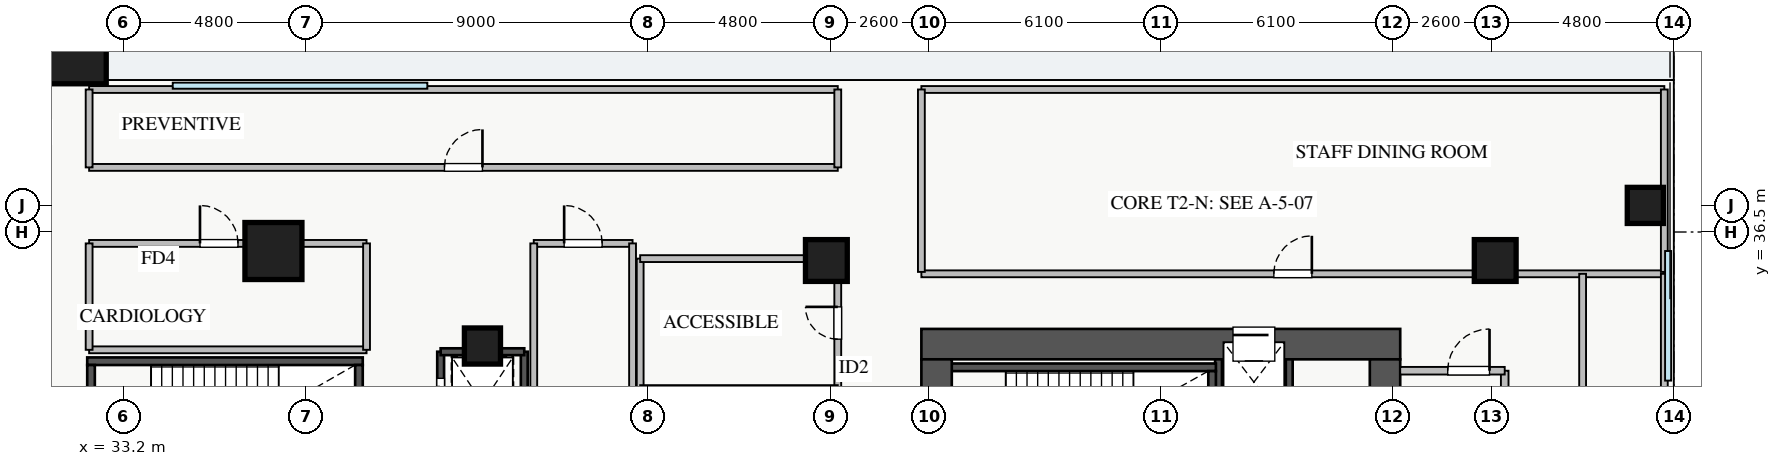
"""IFC4 building model, lengths in metres.
Left out: names, types, materials, properties, quantities, classifications, styles, units other than length and angle.
Written with IfcOpenShell. Run it as: python <this file> out.ifc"""

import sys

from ifc_helpers import new_model, si_unit, direction, frame, frame_2d, origin, origin_2d, place, context, subcontext, project, spatial, rectangle, extrude, source, transform, mapped, element, fill, save


model = new_model("IFC4")
c1 = context("Model", 3, precision=1e-05, world=origin(), true_north=direction((0.0, 1.0)))
c2 = subcontext(c1, "Body", "Model", "MODEL_VIEW")
j1 = project(units=[si_unit("LENGTHUNIT", "METRE"), si_unit("PLANEANGLEUNIT", "RADIAN")], contexts=[c1])
p1 = place(None, origin())
s1 = spatial("IfcSite", under=j1, at=p1, CompositionType="ELEMENT")
p2 = place(p1, origin())
s2 = spatial("IfcBuilding", under=s1, at=p2, CompositionType="ELEMENT")
p3 = place(p2, frame((0.0, 0.0, 13.8)))
s3 = spatial("IfcBuildingStorey", under=s2, at=p3, CompositionType="ELEMENT", Elevation=13.8)
for number, where, z_axis, x_axis in (
    (1, (62.02, 29.6, 0.0), (0.0, 0.0, 1.0), (0.0, 1.0, 0.0)),
    (2, (63.88, 29.6, 0.0), (0.0, 0.0, 1.0), (0.0, 1.0, 0.0)),
):
    element("IfcWall", number, at=place(p3, frame(where, z_axis=z_axis, x_axis=x_axis)), inside=s3, PredefinedType="SHEAR", context=c2, shape_type="SweptSolid", body=[
        extrude(rectangle(XDim=3.95, YDim=0.18, at=frame_2d((1.975, 0.0))), origin(), (0.0, 0.0, 1.0), 4.15),
    ])
p4 = place(p3, frame((41.55, 30.65, 0.0), z_axis=(0.0, 0.0, 1.0), x_axis=(0.0, 1.0, 0.0)))
e3 = element("IfcWall", 3, at=p4, inside=s3, PredefinedType="SHEAR", context=c2, shape_type="SweptSolid", body=[
    extrude(rectangle(XDim=2.7, YDim=0.18, at=frame_2d((1.35, 0.0))), origin(), (0.0, 0.0, 1.0), 4.15),
])
p5 = place(p4, frame((0.7, 0.0, 0.0)))
e4 = element("IfcOpeningElement", 4, at=p5, cuts=e3, PredefinedType="OPENING", context=c2, shape_type="SweptSolid", body=[
    extrude(rectangle(XDim=1.3, YDim=2.05, at=frame_2d((0.65, 1.025))), frame((0.0, 0.1, 0.0), z_axis=(0.0, -1.0, 0.0), x_axis=(1.0, 0.0, 0.0)), (0.0, 0.0, 1.0), 0.2),
])
p6 = place(p3, frame((43.75, 30.65, 0.0), z_axis=(0.0, 0.0, 1.0), x_axis=(0.0, 1.0, 0.0)))
e5 = element("IfcWall", 5, at=p6, inside=s3, PredefinedType="SHEAR", context=c2, shape_type="SweptSolid", body=[
    extrude(rectangle(XDim=2.7, YDim=0.18, at=frame_2d((1.35, 0.0))), origin(), (0.0, 0.0, 1.0), 4.15),
])
p7 = place(p3, frame((41.55, 33.35, 0.0), z_axis=(0.0, 0.0, 1.0), x_axis=(1.0, 0.0, 0.0)))
e6 = element("IfcWall", 6, at=p7, inside=s3, PredefinedType="SHEAR", context=c2, shape_type="SweptSolid", body=[
    extrude(rectangle(XDim=2.2, YDim=0.18, at=frame_2d((1.1, 0.0))), origin(), (0.0, 0.0, 1.0), 4.15),
])
p8 = place(p3, frame((54.8, 32.94, 0.0), z_axis=(0.0, 0.0, 1.0), x_axis=(1.0, 0.0, 0.0)))
e7 = element("IfcWall", 7, at=p8, inside=s3, PredefinedType="SHEAR", context=c2, shape_type="SweptSolid", body=[
    extrude(rectangle(XDim=7.15, YDim=0.2, at=frame_2d((3.575, 0.0))), origin(), (0.0, 0.0, 1.0), 4.4),
])
p9 = place(p3, frame((61.85, 29.9, 0.0), z_axis=(0.0, 0.0, 1.0), x_axis=(0.0, 1.0, 0.0)))
e8 = element("IfcWall", 8, at=p9, inside=s3, PredefinedType="SHEAR", context=c2, shape_type="SweptSolid", body=[
    extrude(rectangle(XDim=2.94, YDim=0.2, at=frame_2d((1.47, 0.0))), origin(), (0.0, 0.0, 1.0), 4.4),
])
p10 = place(p3, frame((32.25, 33.1, 0.0), z_axis=(0.0, 0.0, 1.0), x_axis=(1.0, 0.0, 0.0)))
e9 = element("IfcWall", 9, at=p10, inside=s3, PredefinedType="SHEAR", context=c2, shape_type="SweptSolid", body=[
    extrude(rectangle(XDim=7.25, YDim=0.2, at=frame_2d((3.625, 0.0))), origin(), (0.0, 0.0, 1.0), 4.4),
])
p11 = place(p3, frame((32.35, 29.96, 0.0), z_axis=(0.0, 0.0, 1.0), x_axis=(0.0, 1.0, 0.0)))
e10 = element("IfcWall", 10, at=p11, inside=s3, PredefinedType="SHEAR", context=c2, shape_type="SweptSolid", body=[
    extrude(rectangle(XDim=3.04, YDim=0.2, at=frame_2d((1.52, 0.0))), origin(), (0.0, 0.0, 1.0), 4.4),
])
p12 = place(p11, frame((0.95, 0.0, 0.0)))
e11 = element("IfcOpeningElement", 11, at=p12, cuts=e10, PredefinedType="OPENING", context=c2, shape_type="SweptSolid", body=[
    extrude(rectangle(XDim=1.1, YDim=2.05, at=frame_2d((0.55, 1.025))), frame((0.0, 0.11, 0.0), z_axis=(0.0, -1.0, 0.0), x_axis=(1.0, 0.0, 0.0)), (0.0, 0.0, 1.0), 0.22),
])
p13 = place(p3, frame((39.4, 29.96, 0.0), z_axis=(0.0, 0.0, 1.0), x_axis=(0.0, 1.0, 0.0)))
e12 = element("IfcWall", 12, at=p13, inside=s3, PredefinedType="SHEAR", context=c2, shape_type="SweptSolid", body=[
    extrude(rectangle(XDim=3.04, YDim=0.2, at=frame_2d((1.52, 0.0))), origin(), (0.0, 0.0, 1.0), 4.4),
])
p14 = place(p3, frame((54.2, 33.55, 0.0), z_axis=(0.0, 0.0, 1.0), x_axis=(1.0, 0.0, 0.0)))
e13 = element("IfcWall", 13, at=p14, inside=s3, PredefinedType="SHEAR", context=c2, shape_type="SweptSolid", body=[
    extrude(rectangle(XDim=12.6, YDim=0.8, at=frame_2d((6.3, 0.0))), origin(), (0.0, 0.0, 1.0), 4.4),
])
p15 = place(p14, frame((8.2, 0.0, 0.0)))
e14 = element("IfcOpeningElement", 14, at=p15, cuts=e13, PredefinedType="OPENING", context=c2, shape_type="SweptSolid", body=[
    extrude(rectangle(XDim=1.1, YDim=2.05, at=frame_2d((0.55, 1.025))), frame((0.0, 0.41, 0.0), z_axis=(0.0, -1.0, 0.0), x_axis=(1.0, 0.0, 0.0)), (0.0, 0.0, 1.0), 0.82),
])
p16 = place(p3, frame((54.6, 29.6, 0.0), z_axis=(0.0, 0.0, 1.0), x_axis=(0.0, 1.0, 0.0)))
e15 = element("IfcWall", 15, at=p16, inside=s3, PredefinedType="SHEAR", context=c2, shape_type="SweptSolid", body=[
    extrude(rectangle(XDim=3.55, YDim=0.8, at=frame_2d((1.775, 0.0))), origin(), (0.0, 0.0, 1.0), 4.4),
])
p17 = place(p16, frame((0.95, 0.0, 0.0)))
e16 = element("IfcOpeningElement", 16, at=p17, cuts=e15, PredefinedType="OPENING", context=c2, shape_type="SweptSolid", body=[
    extrude(rectangle(XDim=1.1, YDim=2.05, at=frame_2d((0.55, 1.025))), frame((0.0, 0.41, 0.0), z_axis=(0.0, -1.0, 0.0), x_axis=(1.0, 0.0, 0.0)), (0.0, 0.0, 1.0), 0.82),
])
p18 = place(p3, frame((66.4, 29.6, 0.0), z_axis=(0.0, 0.0, 1.0), x_axis=(0.0, 1.0, 0.0)))
e17 = element("IfcWall", 17, at=p18, inside=s3, PredefinedType="SHEAR", context=c2, shape_type="SweptSolid", body=[
    extrude(rectangle(XDim=3.55, YDim=0.8, at=frame_2d((1.775, 0.0))), origin(), (0.0, 0.0, 1.0), 4.4),
])
p19 = place(p18, frame((1.05, 0.0, 0.0)))
e18 = element("IfcOpeningElement", 18, at=p19, cuts=e17, PredefinedType="OPENING", context=c2, shape_type="SweptSolid", body=[
    extrude(rectangle(XDim=1.3, YDim=2.05, at=frame_2d((0.65, 1.025))), frame((0.0, 0.41, 0.0), z_axis=(0.0, -1.0, 0.0), x_axis=(1.0, 0.0, 0.0)), (0.0, 0.0, 1.0), 0.82),
])
m1 = source(origin(), c2, "Body", "SweptSolid", [
    extrude(rectangle(XDim=1.5, YDim=1.5, at=origin_2d()), origin(), (0.0, 0.0, 1.0), 4.4),
])
for number, where, z_axis, x_axis in (
    (19, (37.15, 36.0, 0.0), (0.0, 0.0, 1.0), (1.0, 0.0, 0.0)),
    (20, (32.0, 41.15, 0.0), (0.0, 0.0, 1.0), (1.0, 0.0, 0.0)),
):
    element("IfcColumn", number, at=place(p3, frame(where, z_axis=z_axis, x_axis=x_axis)), inside=s3, PredefinedType="COLUMN", context=c2, shape_type="MappedRepresentation", body=[
        mapped(m1, transform((0.0, 0.0, 0.0), x_axis=(1.0, 0.0, 0.0), y_axis=(0.0, 1.0, 0.0), z_axis=(0.0, 0.0, 1.0), scale=1.0)),
    ])
m2 = source(origin(), c2, "Body", "SweptSolid", [
    extrude(rectangle(XDim=1.1, YDim=1.1, at=origin_2d()), origin(), (0.0, 0.0, 1.0), 4.4),
])
for number, where, z_axis, x_axis in (
    (21, (69.3, 35.75, 0.0), (0.0, 0.0, 1.0), (1.0, 0.0, 0.0)),
    (22, (51.7, 35.75, 0.0), (0.0, 0.0, 1.0), (1.0, 0.0, 0.0)),
):
    element("IfcColumn", number, at=place(p3, frame(where, z_axis=z_axis, x_axis=x_axis)), inside=s3, PredefinedType="COLUMN", context=c2, shape_type="MappedRepresentation", body=[
        mapped(m2, transform((0.0, 0.0, 0.0), x_axis=(1.0, 0.0, 0.0), y_axis=(0.0, 1.0, 0.0), z_axis=(0.0, 0.0, 1.0), scale=1.0)),
    ])
m3 = source(origin(), c2, "Body", "SweptSolid", [
    extrude(rectangle(XDim=0.95, YDim=0.95, at=origin_2d()), origin(), (0.0, 0.0, 1.0), 4.4),
])
for number, where, z_axis, x_axis in (
    (23, (42.65, 33.5, 0.0), (0.0, 0.0, 1.0), (1.0, 0.0, 0.0)),
    (24, (73.25, 37.2, 0.0), (0.0, 0.0, 1.0), (1.0, 0.0, 0.0)),
):
    element("IfcColumn", number, at=place(p3, frame(where, z_axis=z_axis, x_axis=x_axis)), inside=s3, PredefinedType="COLUMN", context=c2, shape_type="MappedRepresentation", body=[
        mapped(m3, transform((0.0, 0.0, 0.0), x_axis=(1.0, 0.0, 0.0), y_axis=(0.0, 1.0, 0.0), z_axis=(0.0, 0.0, 1.0), scale=1.0)),
    ])
p20 = place(p3, frame((69.55, 28.85, 0.0), z_axis=(0.0, 0.0, 1.0), x_axis=(0.0, 1.0, 0.0)))
e25 = element("IfcWall", 25, at=p20, inside=s3, PredefinedType="PARTITIONING", context=c2, shape_type="SweptSolid", body=[
    extrude(rectangle(XDim=4.0, YDim=0.2, at=frame_2d((2.0, 0.0))), origin(), (0.0, 0.0, 1.0), 4.15),
])
p21 = place(p3, frame((66.8, 32.85, 0.0), z_axis=(0.0, 0.0, 1.0), x_axis=(1.0, 0.0, 0.0)))
e26 = element("IfcWall", 26, at=p21, inside=s3, PredefinedType="PARTITIONING", context=c2, shape_type="SweptSolid", body=[
    extrude(rectangle(XDim=2.75, YDim=0.2, at=frame_2d((1.375, 0.0))), origin(), (0.0, 0.0, 1.0), 4.15),
])
p22 = place(p21, frame((1.25, 0.0, 0.0)))
e27 = element("IfcOpeningElement", 27, at=p22, cuts=e26, PredefinedType="OPENING", context=c2, shape_type="SweptSolid", body=[
    extrude(rectangle(XDim=1.1, YDim=2.05, at=frame_2d((0.55, 1.025))), frame((0.0, 0.11, 0.0), z_axis=(0.0, -1.0, 0.0), x_axis=(1.0, 0.0, 0.0)), (0.0, 0.0, 1.0), 0.22),
])
p23 = place(p3, frame((52.0, 25.2, 0.0), z_axis=(0.0, 0.0, 1.0), x_axis=(0.0, 1.0, 0.0)))
e28 = element("IfcWall", 28, at=p23, inside=s3, PredefinedType="PARTITIONING", context=c2, shape_type="SweptSolid", body=[
    extrude(rectangle(XDim=10.6, YDim=0.18, at=frame_2d((5.3, 0.0))), origin(), (0.0, 0.0, 1.0), 4.15),
])
p24 = place(p23, frame((1.375, 0.0, 0.0)))
e29 = element("IfcOpeningElement", 29, at=p24, cuts=e28, PredefinedType="OPENING", context=c2, shape_type="SweptSolid", body=[
    extrude(rectangle(XDim=0.85, YDim=2.05, at=frame_2d((0.425, 1.025))), frame((0.0, 0.1, 0.0), z_axis=(0.0, -1.0, 0.0), x_axis=(1.0, 0.0, 0.0)), (0.0, 0.0, 1.0), 0.2),
])
p25 = place(p23, frame((4.98, 0.0, 0.0)))
e30 = element("IfcOpeningElement", 30, at=p25, cuts=e28, PredefinedType="OPENING", context=c2, shape_type="SweptSolid", body=[
    extrude(rectangle(XDim=0.85, YDim=2.05, at=frame_2d((0.425, 1.025))), frame((0.0, 0.1, 0.0), z_axis=(0.0, -1.0, 0.0), x_axis=(1.0, 0.0, 0.0)), (0.0, 0.0, 1.0), 0.2),
])
p26 = place(p23, frame((8.48, 0.0, 0.0)))
e31 = element("IfcOpeningElement", 31, at=p26, cuts=e28, PredefinedType="OPENING", context=c2, shape_type="SweptSolid", body=[
    extrude(rectangle(XDim=0.85, YDim=2.05, at=frame_2d((0.425, 1.025))), frame((0.0, 0.1, 0.0), z_axis=(0.0, -1.0, 0.0), x_axis=(1.0, 0.0, 0.0)), (0.0, 0.0, 1.0), 0.2),
])
p27 = place(p3, frame((46.8, 25.2, 0.0), z_axis=(0.0, 0.0, 1.0), x_axis=(0.0, 1.0, 0.0)))
e32 = element("IfcWall", 32, at=p27, inside=s3, PredefinedType="PARTITIONING", context=c2, shape_type="SweptSolid", body=[
    extrude(rectangle(XDim=10.6, YDim=0.18, at=frame_2d((5.3, 0.0))), origin(), (0.0, 0.0, 1.0), 4.15),
])
p28 = place(p3, frame((46.8, 35.8, 0.0), z_axis=(0.0, 0.0, 1.0), x_axis=(1.0, 0.0, 0.0)))
e33 = element("IfcWall", 33, at=p28, inside=s3, PredefinedType="PARTITIONING", context=c2, shape_type="SweptSolid", body=[
    extrude(rectangle(XDim=5.2, YDim=0.18, at=frame_2d((2.6, 0.0))), origin(), (0.0, 0.0, 1.0), 4.15),
])
p29 = place(p3, frame((46.8, 32.41, 0.0), z_axis=(0.0, 0.0, 1.0), x_axis=(1.0, 0.0, 0.0)))
e34 = element("IfcWall", 34, at=p29, inside=s3, PredefinedType="PLUMBINGWALL", context=c2, shape_type="SweptSolid", body=[
    extrude(rectangle(XDim=5.2, YDim=0.12, at=frame_2d((2.6, 0.0))), origin(), (0.0, 0.0, 1.0), 4.15),
])
p30 = place(p3, frame((32.3, 33.4, 0.0), z_axis=(0.0, 0.0, 1.0), x_axis=(1.0, 0.0, 0.0)))
e35 = element("IfcWall", 35, at=p30, inside=s3, PredefinedType="PARTITIONING", context=c2, shape_type="SweptSolid", body=[
    extrude(rectangle(XDim=7.3, YDim=0.18, at=frame_2d((3.65, 0.0))), origin(), (0.0, 0.0, 1.0), 3.445),
])
p31 = place(p3, frame((32.3, 36.2, 0.0), z_axis=(0.0, 0.0, 1.0), x_axis=(1.0, 0.0, 0.0)))
e36 = element("IfcWall", 36, at=p31, inside=s3, PredefinedType="PARTITIONING", context=c2, shape_type="SweptSolid", body=[
    extrude(rectangle(XDim=7.3, YDim=0.18, at=frame_2d((3.65, 0.0))), origin(), (0.0, 0.0, 1.0), 4.15),
])
p32 = place(p31, frame((2.917, 0.0, 0.0)))
e37 = element("IfcOpeningElement", 37, at=p32, cuts=e36, PredefinedType="OPENING", context=c2, shape_type="SweptSolid", body=[
    extrude(rectangle(XDim=1.0, YDim=2.05, at=frame_2d((0.5, 1.025))), frame((0.0, 0.1, 0.0), z_axis=(0.0, -1.0, 0.0), x_axis=(1.0, 0.0, 0.0)), (0.0, 0.0, 1.0), 0.2),
])
for number, where, z_axis, x_axis in (
    (38, (32.3, 33.4, 0.0), (0.0, 0.0, 1.0), (0.0, 1.0, 0.0)),
    (39, (39.6, 33.4, 0.0), (0.0, 0.0, 1.0), (0.0, 1.0, 0.0)),
):
    element("IfcWall", number, at=place(p3, frame(where, z_axis=z_axis, x_axis=x_axis)), inside=s3, PredefinedType="PARTITIONING", context=c2, shape_type="SweptSolid", body=[
        extrude(rectangle(XDim=2.8, YDim=0.18, at=frame_2d((1.4, 0.0))), origin(), (0.0, 0.0, 1.0), 4.15),
    ])
p33 = place(p3, frame((44.0, 36.2, 0.0), z_axis=(0.0, 0.0, 1.0), x_axis=(1.0, 0.0, 0.0)))
e40 = element("IfcWall", 40, at=p33, inside=s3, PredefinedType="PARTITIONING", context=c2, shape_type="SweptSolid", body=[
    extrude(rectangle(XDim=2.6, YDim=0.18, at=frame_2d((1.3, 0.0))), origin(), (0.0, 0.0, 1.0), 4.15),
])
p34 = place(p33, frame((0.8, 0.0, 0.0)))
e41 = element("IfcOpeningElement", 41, at=p34, cuts=e40, PredefinedType="OPENING", context=c2, shape_type="SweptSolid", body=[
    extrude(rectangle(XDim=1.0, YDim=2.05, at=frame_2d((0.5, 1.025))), frame((0.0, 0.1, 0.0), z_axis=(0.0, -1.0, 0.0), x_axis=(1.0, 0.0, 0.0)), (0.0, 0.0, 1.0), 0.2),
])
for number, where, z_axis, x_axis in (
    (42, (44.0, 24.2, 0.0), (0.0, 0.0, 1.0), (0.0, 1.0, 0.0)),
    (43, (46.6, 24.2, 0.0), (0.0, 0.0, 1.0), (0.0, 1.0, 0.0)),
):
    element("IfcWall", number, at=place(p3, frame(where, z_axis=z_axis, x_axis=x_axis)), inside=s3, PredefinedType="PARTITIONING", context=c2, shape_type="SweptSolid", body=[
        extrude(rectangle(XDim=12.0, YDim=0.18, at=frame_2d((6.0, 0.0))), origin(), (0.0, 0.0, 1.0), 4.15),
    ])
p35 = place(p3, frame((54.2, 35.4, 0.0), z_axis=(0.0, 0.0, 1.0), x_axis=(1.0, 0.0, 0.0)))
e44 = element("IfcWall", 44, at=p35, inside=s3, PredefinedType="PARTITIONING", context=c2, shape_type="SweptSolid", body=[
    extrude(rectangle(XDim=19.55, YDim=0.18, at=frame_2d((9.775, 0.0))), origin(), (0.0, 0.0, 1.0), 4.15),
])
p36 = place(p35, frame((9.275, 0.0, 0.0)))
e45 = element("IfcOpeningElement", 45, at=p36, cuts=e44, PredefinedType="OPENING", context=c2, shape_type="SweptSolid", body=[
    extrude(rectangle(XDim=1.0, YDim=2.05, at=frame_2d((0.5, 1.025))), frame((0.0, 0.1, 0.0), z_axis=(0.0, -1.0, 0.0), x_axis=(1.0, 0.0, 0.0)), (0.0, 0.0, 1.0), 0.2),
])
p37 = place(p3, frame((71.6, 10.6, 0.0), z_axis=(0.0, 0.0, 1.0), x_axis=(0.0, 1.0, 0.0)))
e46 = element("IfcWall", 46, at=p37, inside=s3, PredefinedType="PARTITIONING", context=c2, shape_type="SweptSolid", body=[
    extrude(rectangle(XDim=24.8, YDim=0.18, at=frame_2d((12.4, 0.0))), origin(), (0.0, 0.0, 1.0), 4.15),
])
p38 = place(p37, frame((11.9, 0.0, 0.0)))
e47 = element("IfcOpeningElement", 47, at=p38, cuts=e46, PredefinedType="OPENING", context=c2, shape_type="SweptSolid", body=[
    extrude(rectangle(XDim=1.0, YDim=2.05, at=frame_2d((0.5, 1.025))), frame((0.0, 0.1, 0.0), z_axis=(0.0, -1.0, 0.0), x_axis=(1.0, 0.0, 0.0)), (0.0, 0.0, 1.0), 0.2),
])
p39 = place(p3, frame((73.75, 10.6, 0.0), z_axis=(0.0, 0.0, 1.0), x_axis=(0.0, 1.0, 0.0)))
e48 = element("IfcWall", 48, at=p39, inside=s3, PredefinedType="PARTITIONING", context=c2, shape_type="SweptSolid", body=[
    extrude(rectangle(XDim=24.8, YDim=0.18, at=frame_2d((12.4, 0.0))), origin(), (0.0, 0.0, 1.0), 4.15),
])
p40 = place(p3, frame((54.2, 40.25, 0.0), z_axis=(0.0, 0.0, 1.0), x_axis=(1.0, 0.0, 0.0)))
e49 = element("IfcWall", 49, at=p40, inside=s3, PredefinedType="PARTITIONING", context=c2, shape_type="SweptSolid", body=[
    extrude(rectangle(XDim=19.55, YDim=0.18, at=frame_2d((9.775, 0.0))), origin(), (0.0, 0.0, 1.0), 4.15),
])
for number, where, z_axis, x_axis in (
    (50, (54.2, 35.45, 0.0), (0.0, 0.0, 1.0), (0.0, 1.0, 0.0)),
    (51, (73.75, 35.45, 0.0), (0.0, 0.0, 1.0), (0.0, 1.0, 0.0)),
):
    element("IfcWall", number, at=place(p3, frame(where, z_axis=z_axis, x_axis=x_axis)), inside=s3, PredefinedType="PARTITIONING", context=c2, shape_type="SweptSolid", body=[
        extrude(rectangle(XDim=4.8, YDim=0.18, at=frame_2d((2.4, 0.0))), origin(), (0.0, 0.0, 1.0), 4.15),
    ])
p41 = place(p3, frame((32.3, 38.2, 0.0), z_axis=(0.0, 0.0, 1.0), x_axis=(1.0, 0.0, 0.0)))
e52 = element("IfcWall", 52, at=p41, inside=s3, PredefinedType="PARTITIONING", context=c2, shape_type="SweptSolid", body=[
    extrude(rectangle(XDim=19.7, YDim=0.18, at=frame_2d((9.85, 0.0))), origin(), (0.0, 0.0, 1.0), 4.15),
])
p42 = place(p41, frame((9.35, 0.0, 0.0)))
e53 = element("IfcOpeningElement", 53, at=p42, cuts=e52, PredefinedType="OPENING", context=c2, shape_type="SweptSolid", body=[
    extrude(rectangle(XDim=1.0, YDim=2.05, at=frame_2d((0.5, 1.025))), frame((0.0, 0.1, 0.0), z_axis=(0.0, -1.0, 0.0), x_axis=(1.0, 0.0, 0.0)), (0.0, 0.0, 1.0), 0.2),
])
p43 = place(p3, frame((32.3, 40.25, 0.0), z_axis=(0.0, 0.0, 1.0), x_axis=(1.0, 0.0, 0.0)))
e54 = element("IfcWall", 54, at=p43, inside=s3, PredefinedType="PARTITIONING", context=c2, shape_type="SweptSolid", body=[
    extrude(rectangle(XDim=19.7, YDim=0.18, at=frame_2d((9.85, 0.0))), origin(), (0.0, 0.0, 1.0), 4.15),
])
for number, where, z_axis, x_axis in (
    (55, (32.3, 38.2, 0.0), (0.0, 0.0, 1.0), (0.0, 1.0, 0.0)),
    (56, (52.0, 38.2, 0.0), (0.0, 0.0, 1.0), (0.0, 1.0, 0.0)),
):
    element("IfcWall", number, at=place(p3, frame(where, z_axis=z_axis, x_axis=x_axis)), inside=s3, PredefinedType="PARTITIONING", context=c2, shape_type="SweptSolid", body=[
        extrude(rectangle(XDim=2.05, YDim=0.18, at=frame_2d((1.025, 0.0))), origin(), (0.0, 0.0, 1.0), 4.15),
    ])
m4 = source(origin(), c2, "Body", "SweptSolid", [
    extrude(rectangle(XDim=1.1, YDim=2.05, at=frame_2d((0.55, 1.025))), frame((0.0, 0.025, 0.0), z_axis=(0.0, -1.0, 0.0), x_axis=(1.0, 0.0, 0.0)), (0.0, 0.0, 1.0), 0.05),
])
p44 = place(p15, origin())
e57 = element("IfcDoor", 57, at=p44, inside=s3, OperationType="SLIDING_TO_LEFT", PredefinedType="DOOR", context=c2, shape_type="MappedRepresentation", body=[
    mapped(m4, transform((0.0, 0.0, 0.0), x_axis=(1.0, 0.0, 0.0), y_axis=(0.0, 1.0, 0.0), z_axis=(0.0, 0.0, 1.0), scale=1.0)),
])
fill(e14, e57)
m5 = source(origin(), c2, "Body", "SweptSolid", [
    extrude(rectangle(XDim=1.3, YDim=2.05, at=frame_2d((0.65, 1.025))), frame((0.0, 0.025, 0.0), z_axis=(0.0, -1.0, 0.0), x_axis=(1.0, 0.0, 0.0)), (0.0, 0.0, 1.0), 0.05),
])
p45 = place(p5, origin())
e58 = element("IfcDoor", 58, at=p45, inside=s3, OperationType="SLIDING_TO_LEFT", PredefinedType="DOOR", context=c2, shape_type="MappedRepresentation", body=[
    mapped(m5, transform((0.0, 0.0, 0.0), x_axis=(1.0, 0.0, 0.0), y_axis=(0.0, 1.0, 0.0), z_axis=(0.0, 0.0, 1.0), scale=1.0)),
])
fill(e4, e58)
p46 = place(p22, origin())
e59 = element("IfcDoor", 59, at=p46, inside=s3, OperationType="SINGLE_SWING_RIGHT", PredefinedType="DOOR", context=c2, shape_type="MappedRepresentation", body=[
    mapped(m4, transform((0.0, 0.0, 0.0), x_axis=(1.0, 0.0, 0.0), y_axis=(0.0, 1.0, 0.0), z_axis=(0.0, 0.0, 1.0), scale=1.0)),
])
fill(e27, e59)
m6 = source(origin(), c2, "Body", "SweptSolid", [
    extrude(rectangle(XDim=0.85, YDim=2.05, at=frame_2d((0.425, 1.025))), frame((0.0, 0.025, 0.0), z_axis=(0.0, -1.0, 0.0), x_axis=(1.0, 0.0, 0.0)), (0.0, 0.0, 1.0), 0.05),
])
p47 = place(p26, origin())
e60 = element("IfcDoor", 60, at=p47, inside=s3, OperationType="SINGLE_SWING_RIGHT", PredefinedType="DOOR", context=c2, shape_type="MappedRepresentation", body=[
    mapped(m6, transform((0.0, 0.0, 0.0), x_axis=(1.0, 0.0, 0.0), y_axis=(0.0, 1.0, 0.0), z_axis=(0.0, 0.0, 1.0), scale=1.0)),
])
fill(e31, e60)
m7 = source(origin(), c2, "Body", "SweptSolid", [
    extrude(rectangle(XDim=1.0, YDim=2.05, at=frame_2d((0.5, 1.025))), frame((0.0, 0.025, 0.0), z_axis=(0.0, -1.0, 0.0), x_axis=(1.0, 0.0, 0.0)), (0.0, 0.0, 1.0), 0.05),
])
p48 = place(p32, origin())
e61 = element("IfcDoor", 61, at=p48, inside=s3, OperationType="SINGLE_SWING_LEFT", PredefinedType="DOOR", context=c2, shape_type="MappedRepresentation", body=[
    mapped(m7, transform((0.0, 0.0, 0.0), x_axis=(1.0, 0.0, 0.0), y_axis=(0.0, 1.0, 0.0), z_axis=(0.0, 0.0, 1.0), scale=1.0)),
])
fill(e37, e61)
p49 = place(p34, origin())
e62 = element("IfcDoor", 62, at=p49, inside=s3, OperationType="SINGLE_SWING_LEFT", PredefinedType="DOOR", context=c2, shape_type="MappedRepresentation", body=[
    mapped(m7, transform((0.0, 0.0, 0.0), x_axis=(1.0, 0.0, 0.0), y_axis=(0.0, 1.0, 0.0), z_axis=(0.0, 0.0, 1.0), scale=1.0)),
])
fill(e41, e62)
p50 = place(p36, origin())
e63 = element("IfcDoor", 63, at=p50, inside=s3, OperationType="SINGLE_SWING_RIGHT", PredefinedType="DOOR", context=c2, shape_type="MappedRepresentation", body=[
    mapped(m7, transform((0.0, 0.0, 0.0), x_axis=(1.0, 0.0, 0.0), y_axis=(0.0, 1.0, 0.0), z_axis=(0.0, 0.0, 1.0), scale=1.0)),
])
fill(e45, e63)
p51 = place(p42, origin())
e64 = element("IfcDoor", 64, at=p51, inside=s3, OperationType="SINGLE_SWING_RIGHT", PredefinedType="DOOR", context=c2, shape_type="MappedRepresentation", body=[
    mapped(m7, transform((0.0, 0.0, 0.0), x_axis=(1.0, 0.0, 0.0), y_axis=(0.0, 1.0, 0.0), z_axis=(0.0, 0.0, 1.0), scale=1.0)),
])
fill(e53, e64)
save(model, sys.argv[1])
